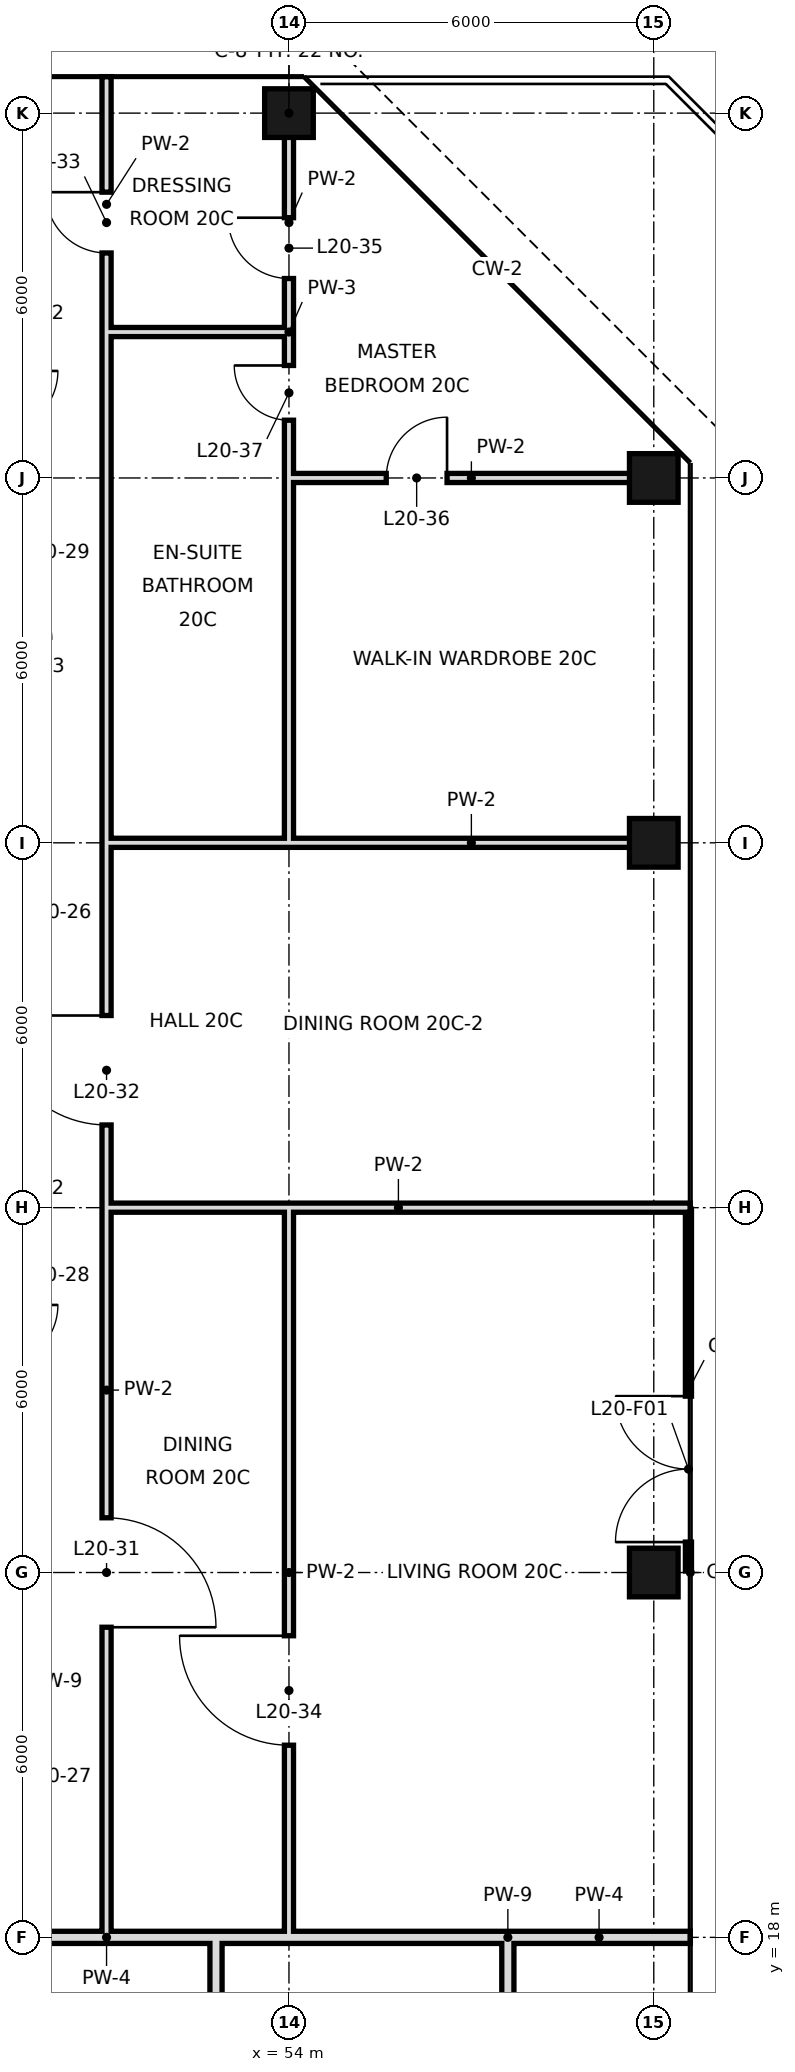
"""IFC4 building model, lengths in metres.
Left out: names, types, materials, properties, quantities, classifications, styles, units other than length and angle.
Written with IfcOpenShell. Run it as: python <this file> out.ifc"""

import sys

from ifc_helpers import new_model, si_unit, direction, frame, frame_2d, origin, origin_2d, place, context, subcontext, project, spatial, rectangle, hollow_rectangle, extrude, element, fill, save


model = new_model("IFC4")
c1 = context("Model", 3, precision=1e-05, world=origin(), true_north=direction((0.0, 1.0)))
c2 = subcontext(c1, "Body", "Model", "MODEL_VIEW")
j1 = project(units=[si_unit("LENGTHUNIT", "METRE"), si_unit("PLANEANGLEUNIT", "RADIAN")], contexts=[c1])
p1 = place(None, origin())
s1 = spatial("IfcSite", under=j1, at=p1, CompositionType="ELEMENT")
p2 = place(p1, origin())
s2 = spatial("IfcBuilding", under=s1, at=p2, CompositionType="ELEMENT")
p3 = place(p2, frame((0.0, 0.0, 96.2)))
s3 = spatial("IfcBuildingStorey", under=s2, at=p3, CompositionType="ELEMENT", Elevation=96.2)
for number, where, z_axis, x_axis in (
    (1, (54.0, 48.0, -0.3), (0.0, 0.0, 1.0), (1.0, 0.0, 0.0)),
    (2, (60.0, 24.0, -0.3), (0.0, 0.0, 1.0), (1.0, 0.0, 0.0)),
    (3, (60.0, 36.0, -0.3), (0.0, 0.0, 1.0), (1.0, 0.0, 0.0)),
    (4, (60.0, 42.0, -0.3), (0.0, 0.0, 1.0), (1.0, 0.0, 0.0)),
):
    element("IfcColumn", number, at=place(p3, frame(where, z_axis=z_axis, x_axis=x_axis)), inside=s3, PredefinedType="COLUMN", context=c2, shape_type="SweptSolid", body=[
        extrude(hollow_rectangle(XDim=0.8, YDim=0.8, WallThickness=0.04, at=origin_2d()), origin(), (0.0, 0.0, 1.0), 3.9),
    ])
p4 = place(p3, frame((60.57, 24.025, 0.0), z_axis=(0.0, 0.0, 1.0), x_axis=(0.0, 1.0, 0.0)))
e5 = element("IfcWall", 5, at=p4, inside=s3, PredefinedType="SOLIDWALL", context=c2, shape_type="SweptSolid", body=[
    extrude(rectangle(XDim=5.95, YDim=0.1, at=frame_2d((2.975, 0.0))), origin(), (0.0, 0.0, 1.0), 3.42),
])
p5 = place(p4, frame((0.476, 0.0, 0.0)))
e6 = element("IfcOpeningElement", 6, at=p5, cuts=e5, PredefinedType="OPENING", context=c2, shape_type="SweptSolid", body=[
    extrude(rectangle(XDim=2.4, YDim=2.4, at=frame_2d((1.2, 1.2))), frame((0.0, 0.06, 0.0), z_axis=(0.0, -1.0, 0.0), x_axis=(1.0, 0.0, 0.0)), (0.0, 0.0, 1.0), 0.12),
])
p6 = place(p3, frame((51.0, 18.0, 0.0), z_axis=(0.0, 0.0, 1.0), x_axis=(0.0, 1.0, 0.0)))
e7 = element("IfcWall", 7, at=p6, inside=s3, PredefinedType="PARTITIONING", context=c2, shape_type="SweptSolid", body=[
    extrude(rectangle(XDim=18.0, YDim=0.15, at=frame_2d((9.0, 0.0))), origin(), (0.0, 0.0, 1.0), 3.42),
])
p7 = place(p6, frame((5.1, 0.0, 0.0)))
e8 = element("IfcOpeningElement", 8, at=p7, cuts=e7, PredefinedType="OPENING", context=c2, shape_type="SweptSolid", body=[
    extrude(rectangle(XDim=1.8, YDim=2.4, at=frame_2d((0.9, 1.2))), frame((0.0, 0.085, 0.0), z_axis=(0.0, -1.0, 0.0), x_axis=(1.0, 0.0, 0.0)), (0.0, 0.0, 1.0), 0.17),
])
p8 = place(p6, frame((13.36, 0.0, 0.0)))
e9 = element("IfcOpeningElement", 9, at=p8, cuts=e7, PredefinedType="OPENING", context=c2, shape_type="SweptSolid", body=[
    extrude(rectangle(XDim=1.8, YDim=2.4, at=frame_2d((0.9, 1.2))), frame((0.0, 0.085, 0.0), z_axis=(0.0, -1.0, 0.0), x_axis=(1.0, 0.0, 0.0)), (0.0, 0.0, 1.0), 0.17),
])
p9 = place(p3, frame((51.0, 44.4, 0.0), z_axis=(0.0, 0.0, 1.0), x_axis=(0.0, 1.0, 0.0)))
e10 = element("IfcWall", 10, at=p9, inside=s3, PredefinedType="PARTITIONING", context=c2, shape_type="SweptSolid", body=[
    extrude(rectangle(XDim=4.2, YDim=0.15, at=frame_2d((2.1, 0.0))), origin(), (0.0, 0.0, 1.0), 3.42),
])
p10 = place(p9, frame((1.3, 0.0, 0.0)))
e11 = element("IfcOpeningElement", 11, at=p10, cuts=e10, PredefinedType="OPENING", context=c2, shape_type="SweptSolid", body=[
    extrude(rectangle(XDim=1.0, YDim=2.4, at=frame_2d((0.5, 1.2))), frame((0.0, 0.085, 0.0), z_axis=(0.0, -1.0, 0.0), x_axis=(1.0, 0.0, 0.0)), (0.0, 0.0, 1.0), 0.17),
])
p11 = place(p3, frame((51.0, 36.0, 0.0), z_axis=(0.0, 0.0, 1.0), x_axis=(0.0, 1.0, 0.0)))
e12 = element("IfcWall", 12, at=p11, inside=s3, PredefinedType="PARTITIONING", context=c2, shape_type="SweptSolid", body=[
    extrude(rectangle(XDim=8.4, YDim=0.15, at=frame_2d((4.2, 0.0))), origin(), (0.0, 0.0, 1.0), 3.42),
])
p12 = place(p3, frame((52.8, 10.8, 0.0), z_axis=(0.0, 0.0, 1.0), x_axis=(0.0, 1.0, 0.0)))
e13 = element("IfcWall", 13, at=p12, inside=s3, PredefinedType="SOLIDWALL", context=c2, shape_type="SweptSolid", body=[
    extrude(rectangle(XDim=7.2, YDim=0.2, at=frame_2d((3.6, 0.0))), origin(), (0.0, 0.0, 1.0), 2.72),
])
p13 = place(p3, frame((54.0, 18.0, 0.0), z_axis=(0.0, 0.0, 1.0), x_axis=(0.0, 1.0, 0.0)))
e14 = element("IfcWall", 14, at=p13, inside=s3, PredefinedType="PARTITIONING", context=c2, shape_type="SweptSolid", body=[
    extrude(rectangle(XDim=12.0, YDim=0.15, at=frame_2d((6.0, 0.0))), origin(), (0.0, 0.0, 1.0), 3.42),
])
p14 = place(p13, frame((3.16, 0.0, 0.0)))
e15 = element("IfcOpeningElement", 15, at=p14, cuts=e14, PredefinedType="OPENING", context=c2, shape_type="SweptSolid", body=[
    extrude(rectangle(XDim=1.8, YDim=2.4, at=frame_2d((0.9, 1.2))), frame((0.0, 0.085, 0.0), z_axis=(0.0, -1.0, 0.0), x_axis=(1.0, 0.0, 0.0)), (0.0, 0.0, 1.0), 0.17),
])
p15 = place(p3, frame((54.0, 44.4, 0.0), z_axis=(0.0, 0.0, 1.0), x_axis=(0.0, 1.0, 0.0)))
e16 = element("IfcWall", 16, at=p15, inside=s3, PredefinedType="PARTITIONING", context=c2, shape_type="SweptSolid", body=[
    extrude(rectangle(XDim=3.6, YDim=0.15, at=frame_2d((1.8, 0.0))), origin(), (0.0, 0.0, 1.0), 3.42),
])
p16 = place(p15, frame((0.88, 0.0, 0.0)))
e17 = element("IfcOpeningElement", 17, at=p16, cuts=e16, PredefinedType="OPENING", context=c2, shape_type="SweptSolid", body=[
    extrude(rectangle(XDim=1.0, YDim=2.4, at=frame_2d((0.5, 1.2))), frame((0.0, 0.085, 0.0), z_axis=(0.0, -1.0, 0.0), x_axis=(1.0, 0.0, 0.0)), (0.0, 0.0, 1.0), 0.17),
])
p17 = place(p3, frame((54.0, 36.0, 0.0), z_axis=(0.0, 0.0, 1.0), x_axis=(0.0, 1.0, 0.0)))
e18 = element("IfcWall", 18, at=p17, inside=s3, PredefinedType="PARTITIONING", context=c2, shape_type="SweptSolid", body=[
    extrude(rectangle(XDim=8.4, YDim=0.15, at=frame_2d((4.2, 0.0))), origin(), (0.0, 0.0, 1.0), 3.42),
])
p18 = place(p17, frame((6.95, 0.0, 0.0)))
e19 = element("IfcOpeningElement", 19, at=p18, cuts=e18, PredefinedType="OPENING", context=c2, shape_type="SweptSolid", body=[
    extrude(rectangle(XDim=0.9, YDim=2.4, at=frame_2d((0.45, 1.2))), frame((0.0, 0.085, 0.0), z_axis=(0.0, -1.0, 0.0), x_axis=(1.0, 0.0, 0.0)), (0.0, 0.0, 1.0), 0.17),
])
p19 = place(p3, frame((57.6, 10.8, 0.0), z_axis=(0.0, 0.0, 1.0), x_axis=(0.0, 1.0, 0.0)))
e20 = element("IfcWall", 20, at=p19, inside=s3, PredefinedType="SOLIDWALL", context=c2, shape_type="SweptSolid", body=[
    extrude(rectangle(XDim=7.2, YDim=0.2, at=frame_2d((3.6, 0.0))), origin(), (0.0, 0.0, 1.0), 2.72),
])
p20 = place(p3, frame((52.8, 18.0, 0.0), z_axis=(0.0, 0.0, 1.0), x_axis=(1.0, 0.0, 0.0)))
e21 = element("IfcWall", 21, at=p20, inside=s3, PredefinedType="SOLIDWALL", context=c2, shape_type="SweptSolid", body=[
    extrude(rectangle(XDim=4.8, YDim=0.2, at=frame_2d((2.4, 0.0))), origin(), (0.0, 0.0, 1.0), 2.72),
])
p21 = place(p3, frame((49.2, 18.0, 0.0), z_axis=(0.0, 0.0, 1.0), x_axis=(1.0, 0.0, 0.0)))
e22 = element("IfcWall", 22, at=p21, inside=s3, PredefinedType="SOLIDWALL", context=c2, shape_type="SweptSolid", body=[
    extrude(rectangle(XDim=3.6, YDim=0.2, at=frame_2d((1.8, 0.0))), origin(), (0.0, 0.0, 1.0), 2.72),
])
p22 = place(p3, frame((57.6, 18.0, 0.0), z_axis=(0.0, 0.0, 1.0), x_axis=(1.0, 0.0, 0.0)))
e23 = element("IfcWall", 23, at=p22, inside=s3, PredefinedType="SOLIDWALL", context=c2, shape_type="SweptSolid", body=[
    extrude(rectangle(XDim=3.0, YDim=0.2, at=frame_2d((1.5, 0.0))), origin(), (0.0, 0.0, 1.0), 2.72),
])
p23 = place(p3, frame((51.0, 30.0, 0.0), z_axis=(0.0, 0.0, 1.0), x_axis=(1.0, 0.0, 0.0)))
e24 = element("IfcWall", 24, at=p23, inside=s3, PredefinedType="PARTITIONING", context=c2, shape_type="SweptSolid", body=[
    extrude(rectangle(XDim=9.6, YDim=0.15, at=frame_2d((4.8, 0.0))), origin(), (0.0, 0.0, 1.0), 2.72),
])
p24 = place(p3, frame((54.0, 36.0, 0.0), z_axis=(0.0, 0.0, 1.0), x_axis=(1.0, 0.0, 0.0)))
e25 = element("IfcWall", 25, at=p24, inside=s3, PredefinedType="PARTITIONING", context=c2, shape_type="SweptSolid", body=[
    extrude(rectangle(XDim=6.0, YDim=0.15, at=frame_2d((3.0, 0.0))), origin(), (0.0, 0.0, 1.0), 2.72),
])
p25 = place(p3, frame((51.0, 36.0, 0.0), z_axis=(0.0, 0.0, 1.0), x_axis=(1.0, 0.0, 0.0)))
e26 = element("IfcWall", 26, at=p25, inside=s3, PredefinedType="PARTITIONING", context=c2, shape_type="SweptSolid", body=[
    extrude(rectangle(XDim=3.0, YDim=0.15, at=frame_2d((1.5, 0.0))), origin(), (0.0, 0.0, 1.0), 2.72),
])
p26 = place(p3, frame((54.0, 42.0, 0.0), z_axis=(0.0, 0.0, 1.0), x_axis=(1.0, 0.0, 0.0)))
e27 = element("IfcWall", 27, at=p26, inside=s3, PredefinedType="PARTITIONING", context=c2, shape_type="SweptSolid", body=[
    extrude(rectangle(XDim=6.0, YDim=0.15, at=frame_2d((3.0, 0.0))), origin(), (0.0, 0.0, 1.0), 2.72),
])
p27 = place(p26, frame((1.6, 0.0, 0.0)))
e28 = element("IfcOpeningElement", 28, at=p27, cuts=e27, PredefinedType="OPENING", context=c2, shape_type="SweptSolid", body=[
    extrude(rectangle(XDim=1.0, YDim=2.4, at=frame_2d((0.5, 1.2))), frame((0.0, 0.085, 0.0), z_axis=(0.0, -1.0, 0.0), x_axis=(1.0, 0.0, 0.0)), (0.0, 0.0, 1.0), 0.17),
])
p28 = place(p3, frame((51.0, 44.4, 0.0), z_axis=(0.0, 0.0, 1.0), x_axis=(1.0, 0.0, 0.0)))
e29 = element("IfcWall", 29, at=p28, inside=s3, PredefinedType="PARTITIONING", context=c2, shape_type="SweptSolid", body=[
    extrude(rectangle(XDim=3.0, YDim=0.15, at=frame_2d((1.5, 0.0))), origin(), (0.0, 0.0, 1.0), 3.42),
])
p29 = place(p5, origin())
e30 = element("IfcDoor", 30, at=p29, inside=s3, OperationType="DOUBLE_DOOR_SINGLE_SWING", PredefinedType="DOOR", context=c2, shape_type="SweptSolid", body=[
    extrude(rectangle(XDim=2.4, YDim=2.4, at=frame_2d((1.2, 1.2))), frame((0.0, 0.025, 0.0), z_axis=(0.0, -1.0, 0.0), x_axis=(1.0, 0.0, 0.0)), (0.0, 0.0, 1.0), 0.05),
])
fill(e6, e30)
p30 = place(p7, frame((1.8, 0.0, 0.0), z_axis=(0.0, 0.0, 1.0), x_axis=(-1.0, 0.0, 0.0)))
e31 = element("IfcDoor", 31, at=p30, inside=s3, OperationType="SINGLE_SWING_RIGHT", PredefinedType="DOOR", context=c2, shape_type="SweptSolid", body=[
    extrude(rectangle(XDim=1.8, YDim=2.4, at=frame_2d((0.9, 1.2))), frame((0.0, 0.025, 0.0), z_axis=(0.0, -1.0, 0.0), x_axis=(1.0, 0.0, 0.0)), (0.0, 0.0, 1.0), 0.05),
])
fill(e8, e31)
p31 = place(p8, frame((1.8, 0.0, 0.0), z_axis=(0.0, 0.0, 1.0), x_axis=(-1.0, 0.0, 0.0)))
e32 = element("IfcDoor", 32, at=p31, inside=s3, OperationType="SINGLE_SWING_LEFT", PredefinedType="DOOR", context=c2, shape_type="SweptSolid", body=[
    extrude(rectangle(XDim=1.8, YDim=2.4, at=frame_2d((0.9, 1.2))), frame((0.0, 0.025, 0.0), z_axis=(0.0, -1.0, 0.0), x_axis=(1.0, 0.0, 0.0)), (0.0, 0.0, 1.0), 0.05),
])
fill(e9, e32)
p32 = place(p10, frame((1.0, 0.0, 0.0), z_axis=(0.0, 0.0, 1.0), x_axis=(-1.0, 0.0, 0.0)))
e33 = element("IfcDoor", 33, at=p32, inside=s3, OperationType="SINGLE_SWING_LEFT", PredefinedType="DOOR", context=c2, shape_type="SweptSolid", body=[
    extrude(rectangle(XDim=1.0, YDim=2.4, at=frame_2d((0.5, 1.2))), frame((0.0, 0.025, 0.0), z_axis=(0.0, -1.0, 0.0), x_axis=(1.0, 0.0, 0.0)), (0.0, 0.0, 1.0), 0.05),
])
fill(e11, e33)
p33 = place(p14, frame((1.8, 0.0, 0.0), z_axis=(0.0, 0.0, 1.0), x_axis=(-1.0, 0.0, 0.0)))
e34 = element("IfcDoor", 34, at=p33, inside=s3, OperationType="SINGLE_SWING_LEFT", PredefinedType="DOOR", context=c2, shape_type="SweptSolid", body=[
    extrude(rectangle(XDim=1.8, YDim=2.4, at=frame_2d((0.9, 1.2))), frame((0.0, 0.025, 0.0), z_axis=(0.0, -1.0, 0.0), x_axis=(1.0, 0.0, 0.0)), (0.0, 0.0, 1.0), 0.05),
])
fill(e15, e34)
p34 = place(p16, frame((1.0, 0.0, 0.0), z_axis=(0.0, 0.0, 1.0), x_axis=(-1.0, 0.0, 0.0)))
e35 = element("IfcDoor", 35, at=p34, inside=s3, OperationType="SINGLE_SWING_LEFT", PredefinedType="DOOR", context=c2, shape_type="SweptSolid", body=[
    extrude(rectangle(XDim=1.0, YDim=2.4, at=frame_2d((0.5, 1.2))), frame((0.0, 0.025, 0.0), z_axis=(0.0, -1.0, 0.0), x_axis=(1.0, 0.0, 0.0)), (0.0, 0.0, 1.0), 0.05),
])
fill(e17, e35)
p35 = place(p27, frame((1.0, 0.0, 0.0), z_axis=(0.0, 0.0, 1.0), x_axis=(-1.0, 0.0, 0.0)))
e36 = element("IfcDoor", 36, at=p35, inside=s3, OperationType="SINGLE_SWING_LEFT", PredefinedType="DOOR", context=c2, shape_type="SweptSolid", body=[
    extrude(rectangle(XDim=1.0, YDim=2.4, at=frame_2d((0.5, 1.2))), frame((0.0, 0.025, 0.0), z_axis=(0.0, -1.0, 0.0), x_axis=(1.0, 0.0, 0.0)), (0.0, 0.0, 1.0), 0.05),
])
fill(e28, e36)
p36 = place(p18, frame((0.9, 0.0, 0.0), z_axis=(0.0, 0.0, 1.0), x_axis=(-1.0, 0.0, 0.0)))
e37 = element("IfcDoor", 37, at=p36, inside=s3, OperationType="SINGLE_SWING_LEFT", PredefinedType="DOOR", context=c2, shape_type="SweptSolid", body=[
    extrude(rectangle(XDim=0.9, YDim=2.4, at=frame_2d((0.45, 1.2))), frame((0.0, 0.025, 0.0), z_axis=(0.0, -1.0, 0.0), x_axis=(1.0, 0.0, 0.0)), (0.0, 0.0, 1.0), 0.05),
])
fill(e19, e37)
save(model, sys.argv[1])
